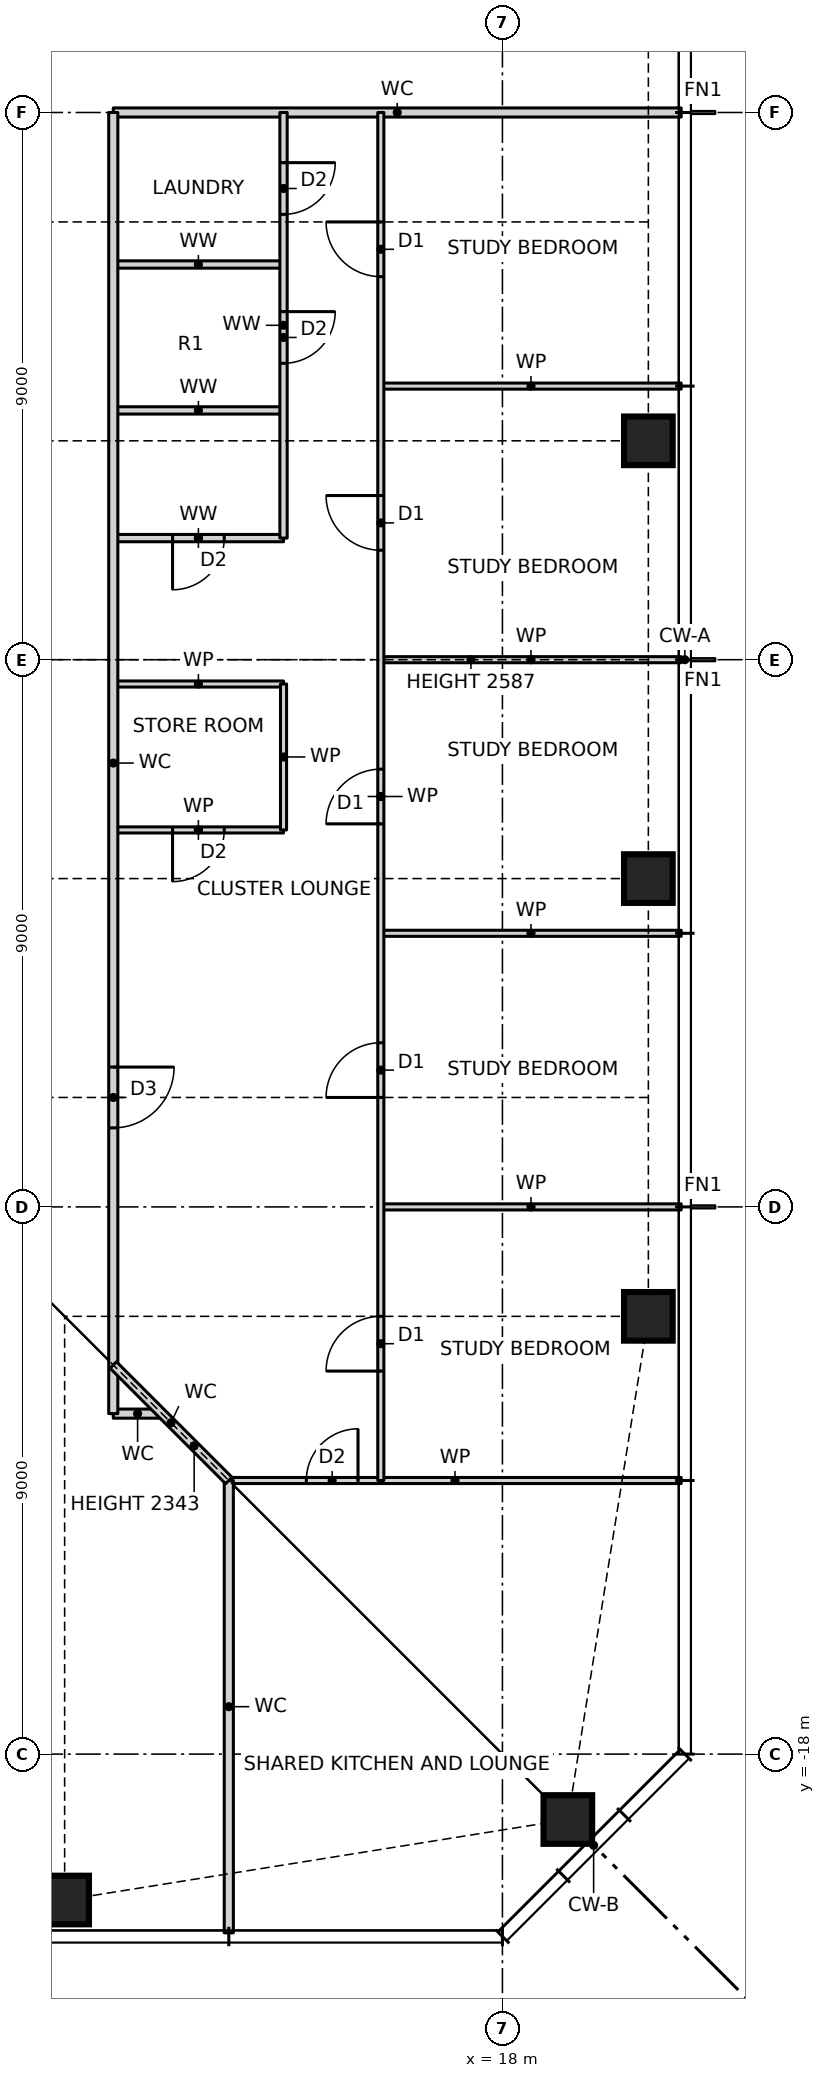
"""IFC4 building model, lengths in metres.
Left out: names, types, materials, properties, quantities, classifications, styles, units other than length and angle.
Written with IfcOpenShell. Run it as: python <this file> out.ifc"""

import sys

from ifc_helpers import new_model, si_unit, direction, frame, frame_2d, origin, origin_2d, place, context, subcontext, project, spatial, rectangle, hollow_rectangle, extrude, element, fill, save


model = new_model("IFC4")
c1 = context("Model", 3, precision=1e-05, world=origin(), true_north=direction((0.0, 1.0)))
c2 = subcontext(c1, "Body", "Model", "MODEL_VIEW")
j1 = project(units=[si_unit("LENGTHUNIT", "METRE"), si_unit("PLANEANGLEUNIT", "RADIAN")], contexts=[c1])
p1 = place(None, origin())
s1 = spatial("IfcSite", under=j1, at=p1, CompositionType="ELEMENT")
p2 = place(p1, origin())
s2 = spatial("IfcBuilding", under=s1, at=p2, CompositionType="ELEMENT")
p3 = place(p2, frame((0.0, 0.0, 84.0)))
s3 = spatial("IfcBuildingStorey", under=s2, at=p3, CompositionType="ELEMENT", Elevation=84.0)
for number, where, z_axis, x_axis in (
    (1, (10.8, -20.4, 0.0), (0.0, 0.0, 1.0), (1.0, 0.0, 0.0)),
    (2, (19.076, -19.076, 0.0), (0.0, 0.0, 1.0), (1.0, 0.0, 0.0)),
    (3, (20.4, -10.8, 0.0), (0.0, 0.0, 1.0), (1.0, 0.0, 0.0)),
    (4, (20.4, -3.6, 0.0), (0.0, 0.0, 1.0), (1.0, 0.0, 0.0)),
    (5, (20.4, 3.6, 0.0), (0.0, 0.0, 1.0), (1.0, 0.0, 0.0)),
):
    element("IfcColumn", number, at=place(p3, frame(where, z_axis=z_axis, x_axis=x_axis)), inside=s3, PredefinedType="COLUMN", context=c2, shape_type="SweptSolid", body=[
        extrude(hollow_rectangle(XDim=0.8, YDim=0.8, WallThickness=0.07, at=origin_2d()), origin(), (0.0, 0.0, 1.0), 3.5),
    ])
p4 = place(p3, frame((13.5, -13.5, 0.0), z_axis=(0.0, 0.0, 1.0), x_axis=(1.0, 0.0, 0.0)))
e6 = element("IfcWall", 6, at=p4, inside=s3, PredefinedType="PARTITIONING", context=c2, shape_type="SweptSolid", body=[
    extrude(rectangle(XDim=7.44, YDim=0.1, at=frame_2d((3.72, 0.0))), origin(), (0.0, 0.0, 1.0), 3.27),
])
p5 = place(p4, frame((1.275, 0.0, 0.0)))
e7 = element("IfcOpeningElement", 7, at=p5, cuts=e6, PredefinedType="OPENING", context=c2, shape_type="SweptSolid", body=[
    extrude(rectangle(XDim=0.85, YDim=2.1, at=frame_2d((0.425, 1.05))), frame((0.0, 0.06, 0.0), z_axis=(0.0, -1.0, 0.0), x_axis=(1.0, 0.0, 0.0)), (0.0, 0.0, 1.0), 0.12),
])
p6 = place(p3, frame((11.6, -12.4, 0.0), z_axis=(0.0, 0.0, 1.0), x_axis=(1.0, 0.0, 0.0)))
e8 = element("IfcWall", 8, at=p6, inside=s3, PredefinedType="PARTITIONING", context=c2, shape_type="SweptSolid", body=[
    extrude(rectangle(XDim=0.8, YDim=0.15, at=frame_2d((0.4, 0.0))), origin(), (0.0, 0.0, 1.0), 3.27),
])
for number, where, z_axis, x_axis in (
    (9, (16.0, -9.0, 0.0), (0.0, 0.0, 1.0), (1.0, 0.0, 0.0)),
    (10, (16.0, -4.5, 0.0), (0.0, 0.0, 1.0), (1.0, 0.0, 0.0)),
):
    element("IfcWall", number, at=place(p3, frame(where, z_axis=z_axis, x_axis=x_axis)), inside=s3, PredefinedType="PARTITIONING", context=c2, shape_type="SweptSolid", body=[
        extrude(rectangle(XDim=4.94, YDim=0.1, at=frame_2d((2.47, 0.0))), origin(), (0.0, 0.0, 1.0), 3.27),
    ])
p7 = place(p3, frame((11.6, -2.8, 0.0), z_axis=(0.0, 0.0, 1.0), x_axis=(1.0, 0.0, 0.0)))
e11 = element("IfcWall", 11, at=p7, inside=s3, PredefinedType="PARTITIONING", context=c2, shape_type="SweptSolid", body=[
    extrude(rectangle(XDim=2.8, YDim=0.1, at=frame_2d((1.4, 0.0))), origin(), (0.0, 0.0, 1.0), 3.27),
])
p8 = place(p7, frame((0.975, 0.0, 0.0)))
e12 = element("IfcOpeningElement", 12, at=p8, cuts=e11, PredefinedType="OPENING", context=c2, shape_type="SweptSolid", body=[
    extrude(rectangle(XDim=0.85, YDim=2.1, at=frame_2d((0.425, 1.05))), frame((0.0, 0.06, 0.0), z_axis=(0.0, -1.0, 0.0), x_axis=(1.0, 0.0, 0.0)), (0.0, 0.0, 1.0), 0.12),
])
p9 = place(p3, frame((11.6, -0.4, 0.0), z_axis=(0.0, 0.0, 1.0), x_axis=(1.0, 0.0, 0.0)))
e13 = element("IfcWall", 13, at=p9, inside=s3, PredefinedType="PARTITIONING", context=c2, shape_type="SweptSolid", body=[
    extrude(rectangle(XDim=2.8, YDim=0.1, at=frame_2d((1.4, 0.0))), origin(), (0.0, 0.0, 1.0), 3.27),
])
p10 = place(p3, frame((16.0, 0.0, 0.0), z_axis=(0.0, 0.0, 1.0), x_axis=(1.0, 0.0, 0.0)))
e14 = element("IfcWall", 14, at=p10, inside=s3, PredefinedType="PARTITIONING", context=c2, shape_type="SweptSolid", body=[
    extrude(rectangle(XDim=4.94, YDim=0.1, at=frame_2d((2.47, 0.0))), origin(), (0.0, 0.0, 1.0), 2.587),
])
p11 = place(p3, frame((11.6, 2.0, 0.0), z_axis=(0.0, 0.0, 1.0), x_axis=(1.0, 0.0, 0.0)))
e15 = element("IfcWall", 15, at=p11, inside=s3, PredefinedType="PARTITIONING", context=c2, shape_type="SweptSolid", body=[
    extrude(rectangle(XDim=2.8, YDim=0.12, at=frame_2d((1.4, 0.0))), origin(), (0.0, 0.0, 1.0), 3.27),
])
p12 = place(p11, frame((0.975, 0.0, 0.0)))
e16 = element("IfcOpeningElement", 16, at=p12, cuts=e15, PredefinedType="OPENING", context=c2, shape_type="SweptSolid", body=[
    extrude(rectangle(XDim=0.85, YDim=2.1, at=frame_2d((0.425, 1.05))), frame((0.0, 0.07, 0.0), z_axis=(0.0, -1.0, 0.0), x_axis=(1.0, 0.0, 0.0)), (0.0, 0.0, 1.0), 0.14),
])
p13 = place(p3, frame((11.6, 4.1, 0.0), z_axis=(0.0, 0.0, 1.0), x_axis=(1.0, 0.0, 0.0)))
e17 = element("IfcWall", 17, at=p13, inside=s3, PredefinedType="PARTITIONING", context=c2, shape_type="SweptSolid", body=[
    extrude(rectangle(XDim=2.8, YDim=0.12, at=frame_2d((1.4, 0.0))), origin(), (0.0, 0.0, 1.0), 3.27),
])
p14 = place(p3, frame((16.0, 4.5, 0.0), z_axis=(0.0, 0.0, 1.0), x_axis=(1.0, 0.0, 0.0)))
e18 = element("IfcWall", 18, at=p14, inside=s3, PredefinedType="PARTITIONING", context=c2, shape_type="SweptSolid", body=[
    extrude(rectangle(XDim=4.94, YDim=0.1, at=frame_2d((2.47, 0.0))), origin(), (0.0, 0.0, 1.0), 3.27),
])
p15 = place(p3, frame((11.6, 6.5, 0.0), z_axis=(0.0, 0.0, 1.0), x_axis=(1.0, 0.0, 0.0)))
e19 = element("IfcWall", 19, at=p15, inside=s3, PredefinedType="PARTITIONING", context=c2, shape_type="SweptSolid", body=[
    extrude(rectangle(XDim=2.8, YDim=0.12, at=frame_2d((1.4, 0.0))), origin(), (0.0, 0.0, 1.0), 3.27),
])
p16 = place(p3, frame((11.6, 9.0, 0.0), z_axis=(0.0, 0.0, 1.0), x_axis=(1.0, 0.0, 0.0)))
e20 = element("IfcWall", 20, at=p16, inside=s3, PredefinedType="PARTITIONING", context=c2, shape_type="SweptSolid", body=[
    extrude(rectangle(XDim=9.34, YDim=0.15, at=frame_2d((4.67, 0.0))), origin(), (0.0, 0.0, 1.0), 3.27),
])
p17 = place(p3, frame((16.0, -13.5, 0.0), z_axis=(0.0, 0.0, 1.0), x_axis=(0.0, 1.0, 0.0)))
e21 = element("IfcWall", 21, at=p17, inside=s3, PredefinedType="PARTITIONING", context=c2, shape_type="SweptSolid", body=[
    extrude(rectangle(XDim=22.5, YDim=0.1, at=frame_2d((11.25, 0.0))), origin(), (0.0, 0.0, 1.0), 3.27),
])
p18 = place(p17, frame((1.8, 0.0, 0.0)))
e22 = element("IfcOpeningElement", 22, at=p18, cuts=e21, PredefinedType="OPENING", context=c2, shape_type="SweptSolid", body=[
    extrude(rectangle(XDim=0.9, YDim=2.1, at=frame_2d((0.45, 1.05))), frame((0.0, 0.06, 0.0), z_axis=(0.0, -1.0, 0.0), x_axis=(1.0, 0.0, 0.0)), (0.0, 0.0, 1.0), 0.12),
])
p19 = place(p17, frame((6.3, 0.0, 0.0)))
e23 = element("IfcOpeningElement", 23, at=p19, cuts=e21, PredefinedType="OPENING", context=c2, shape_type="SweptSolid", body=[
    extrude(rectangle(XDim=0.9, YDim=2.1, at=frame_2d((0.45, 1.05))), frame((0.0, 0.06, 0.0), z_axis=(0.0, -1.0, 0.0), x_axis=(1.0, 0.0, 0.0)), (0.0, 0.0, 1.0), 0.12),
])
p20 = place(p17, frame((10.8, 0.0, 0.0)))
e24 = element("IfcOpeningElement", 24, at=p20, cuts=e21, PredefinedType="OPENING", context=c2, shape_type="SweptSolid", body=[
    extrude(rectangle(XDim=0.9, YDim=2.1, at=frame_2d((0.45, 1.05))), frame((0.0, 0.06, 0.0), z_axis=(0.0, -1.0, 0.0), x_axis=(1.0, 0.0, 0.0)), (0.0, 0.0, 1.0), 0.12),
])
p21 = place(p17, frame((15.3, 0.0, 0.0)))
e25 = element("IfcOpeningElement", 25, at=p21, cuts=e21, PredefinedType="OPENING", context=c2, shape_type="SweptSolid", body=[
    extrude(rectangle(XDim=0.9, YDim=2.1, at=frame_2d((0.45, 1.05))), frame((0.0, 0.06, 0.0), z_axis=(0.0, -1.0, 0.0), x_axis=(1.0, 0.0, 0.0)), (0.0, 0.0, 1.0), 0.12),
])
p22 = place(p17, frame((19.8, 0.0, 0.0)))
e26 = element("IfcOpeningElement", 26, at=p22, cuts=e21, PredefinedType="OPENING", context=c2, shape_type="SweptSolid", body=[
    extrude(rectangle(XDim=0.9, YDim=2.1, at=frame_2d((0.45, 1.05))), frame((0.0, 0.06, 0.0), z_axis=(0.0, -1.0, 0.0), x_axis=(1.0, 0.0, 0.0)), (0.0, 0.0, 1.0), 0.12),
])
p23 = place(p3, frame((14.4, -2.8, 0.0), z_axis=(0.0, 0.0, 1.0), x_axis=(0.0, 1.0, 0.0)))
e27 = element("IfcWall", 27, at=p23, inside=s3, PredefinedType="PARTITIONING", context=c2, shape_type="SweptSolid", body=[
    extrude(rectangle(XDim=2.4, YDim=0.1, at=frame_2d((1.2, 0.0))), origin(), (0.0, 0.0, 1.0), 3.27),
])
p24 = place(p3, frame((14.4, 2.0, 0.0), z_axis=(0.0, 0.0, 1.0), x_axis=(0.0, 1.0, 0.0)))
e28 = element("IfcWall", 28, at=p24, inside=s3, PredefinedType="PARTITIONING", context=c2, shape_type="SweptSolid", body=[
    extrude(rectangle(XDim=7.0, YDim=0.12, at=frame_2d((3.5, 0.0))), origin(), (0.0, 0.0, 1.0), 3.27),
])
p25 = place(p24, frame((2.875, 0.0, 0.0)))
e29 = element("IfcOpeningElement", 29, at=p25, cuts=e28, PredefinedType="OPENING", context=c2, shape_type="SweptSolid", body=[
    extrude(rectangle(XDim=0.85, YDim=2.1, at=frame_2d((0.425, 1.05))), frame((0.0, 0.07, 0.0), z_axis=(0.0, -1.0, 0.0), x_axis=(1.0, 0.0, 0.0)), (0.0, 0.0, 1.0), 0.14),
])
p26 = place(p24, frame((5.325, 0.0, 0.0)))
e30 = element("IfcOpeningElement", 30, at=p26, cuts=e28, PredefinedType="OPENING", context=c2, shape_type="SweptSolid", body=[
    extrude(rectangle(XDim=0.85, YDim=2.1, at=frame_2d((0.425, 1.05))), frame((0.0, 0.07, 0.0), z_axis=(0.0, -1.0, 0.0), x_axis=(1.0, 0.0, 0.0)), (0.0, 0.0, 1.0), 0.14),
])
p27 = place(p3, frame((13.5, -20.94, 0.0), z_axis=(0.0, 0.0, 1.0), x_axis=(0.0, 1.0, 0.0)))
e31 = element("IfcWall", 31, at=p27, inside=s3, PredefinedType="PARTITIONING", context=c2, shape_type="SweptSolid", body=[
    extrude(rectangle(XDim=7.44, YDim=0.15, at=frame_2d((3.72, 0.0))), origin(), (0.0, 0.0, 1.0), 3.27),
])
p28 = place(p3, frame((11.6, -12.4, 0.0), z_axis=(0.0, 0.0, 1.0), x_axis=(0.0, 1.0, 0.0)))
e32 = element("IfcWall", 32, at=p28, inside=s3, PredefinedType="PARTITIONING", context=c2, shape_type="SweptSolid", body=[
    extrude(rectangle(XDim=21.4, YDim=0.15, at=frame_2d((10.7, 0.0))), origin(), (0.0, 0.0, 1.0), 3.27),
])
p29 = place(p28, frame((4.7, 0.0, 0.0)))
e33 = element("IfcOpeningElement", 33, at=p29, cuts=e32, PredefinedType="OPENING", context=c2, shape_type="SweptSolid", body=[
    extrude(rectangle(XDim=1.0, YDim=2.1, at=frame_2d((0.5, 1.05))), frame((0.0, 0.085, 0.0), z_axis=(0.0, -1.0, 0.0), x_axis=(1.0, 0.0, 0.0)), (0.0, 0.0, 1.0), 0.17),
])
p30 = place(p3, frame((13.5, -13.5, 0.0), z_axis=(0.0, 0.0, 1.0), x_axis=(-0.707106781187, 0.707106781187, 0.0)))
e34 = element("IfcWall", 34, at=p30, inside=s3, PredefinedType="PARTITIONING", context=c2, shape_type="SweptSolid", body=[
    extrude(rectangle(XDim=2.687, YDim=0.15, at=frame_2d((1.343, 0.0))), origin(), (0.0, 0.0, 1.0), 2.343),
])
p31 = place(p18, origin())
e35 = element("IfcDoor", 35, at=p31, inside=s3, OperationType="SINGLE_SWING_LEFT", PredefinedType="DOOR", context=c2, shape_type="SweptSolid", body=[
    extrude(rectangle(XDim=0.9, YDim=2.1, at=frame_2d((0.45, 1.05))), frame((0.0, 0.025, 0.0), z_axis=(0.0, -1.0, 0.0), x_axis=(1.0, 0.0, 0.0)), (0.0, 0.0, 1.0), 0.05),
])
fill(e22, e35)
p32 = place(p19, origin())
e36 = element("IfcDoor", 36, at=p32, inside=s3, OperationType="SINGLE_SWING_LEFT", PredefinedType="DOOR", context=c2, shape_type="SweptSolid", body=[
    extrude(rectangle(XDim=0.9, YDim=2.1, at=frame_2d((0.45, 1.05))), frame((0.0, 0.025, 0.0), z_axis=(0.0, -1.0, 0.0), x_axis=(1.0, 0.0, 0.0)), (0.0, 0.0, 1.0), 0.05),
])
fill(e23, e36)
p33 = place(p20, origin())
e37 = element("IfcDoor", 37, at=p33, inside=s3, OperationType="SINGLE_SWING_LEFT", PredefinedType="DOOR", context=c2, shape_type="SweptSolid", body=[
    extrude(rectangle(XDim=0.9, YDim=2.1, at=frame_2d((0.45, 1.05))), frame((0.0, 0.025, 0.0), z_axis=(0.0, -1.0, 0.0), x_axis=(1.0, 0.0, 0.0)), (0.0, 0.0, 1.0), 0.05),
])
fill(e24, e37)
p34 = place(p21, origin())
e38 = element("IfcDoor", 38, at=p34, inside=s3, OperationType="SINGLE_SWING_RIGHT", PredefinedType="DOOR", context=c2, shape_type="SweptSolid", body=[
    extrude(rectangle(XDim=0.9, YDim=2.1, at=frame_2d((0.45, 1.05))), frame((0.0, 0.025, 0.0), z_axis=(0.0, -1.0, 0.0), x_axis=(1.0, 0.0, 0.0)), (0.0, 0.0, 1.0), 0.05),
])
fill(e25, e38)
p35 = place(p22, origin())
e39 = element("IfcDoor", 39, at=p35, inside=s3, OperationType="SINGLE_SWING_RIGHT", PredefinedType="DOOR", context=c2, shape_type="SweptSolid", body=[
    extrude(rectangle(XDim=0.9, YDim=2.1, at=frame_2d((0.45, 1.05))), frame((0.0, 0.025, 0.0), z_axis=(0.0, -1.0, 0.0), x_axis=(1.0, 0.0, 0.0)), (0.0, 0.0, 1.0), 0.05),
])
fill(e26, e39)
p36 = place(p29, frame((1.0, 0.0, 0.0), z_axis=(0.0, 0.0, 1.0), x_axis=(-1.0, 0.0, 0.0)))
e40 = element("IfcDoor", 40, at=p36, inside=s3, OperationType="SINGLE_SWING_LEFT", PredefinedType="DOOR", context=c2, shape_type="SweptSolid", body=[
    extrude(rectangle(XDim=1.0, YDim=2.1, at=frame_2d((0.5, 1.05))), frame((0.0, 0.025, 0.0), z_axis=(0.0, -1.0, 0.0), x_axis=(1.0, 0.0, 0.0)), (0.0, 0.0, 1.0), 0.05),
])
fill(e33, e40)
p37 = place(p8, frame((0.85, 0.0, 0.0), z_axis=(0.0, 0.0, 1.0), x_axis=(-1.0, 0.0, 0.0)))
e41 = element("IfcDoor", 41, at=p37, inside=s3, OperationType="SINGLE_SWING_RIGHT", PredefinedType="DOOR", context=c2, shape_type="SweptSolid", body=[
    extrude(rectangle(XDim=0.85, YDim=2.1, at=frame_2d((0.425, 1.05))), frame((0.0, 0.025, 0.0), z_axis=(0.0, -1.0, 0.0), x_axis=(1.0, 0.0, 0.0)), (0.0, 0.0, 1.0), 0.05),
])
fill(e12, e41)
p38 = place(p12, frame((0.85, 0.0, 0.0), z_axis=(0.0, 0.0, 1.0), x_axis=(-1.0, 0.0, 0.0)))
e42 = element("IfcDoor", 42, at=p38, inside=s3, OperationType="SINGLE_SWING_RIGHT", PredefinedType="DOOR", context=c2, shape_type="SweptSolid", body=[
    extrude(rectangle(XDim=0.85, YDim=2.1, at=frame_2d((0.425, 1.05))), frame((0.0, 0.025, 0.0), z_axis=(0.0, -1.0, 0.0), x_axis=(1.0, 0.0, 0.0)), (0.0, 0.0, 1.0), 0.05),
])
fill(e16, e42)
p39 = place(p25, frame((0.85, 0.0, 0.0), z_axis=(0.0, 0.0, 1.0), x_axis=(-1.0, 0.0, 0.0)))
e43 = element("IfcDoor", 43, at=p39, inside=s3, OperationType="SINGLE_SWING_LEFT", PredefinedType="DOOR", context=c2, shape_type="SweptSolid", body=[
    extrude(rectangle(XDim=0.85, YDim=2.1, at=frame_2d((0.425, 1.05))), frame((0.0, 0.025, 0.0), z_axis=(0.0, -1.0, 0.0), x_axis=(1.0, 0.0, 0.0)), (0.0, 0.0, 1.0), 0.05),
])
fill(e29, e43)
p40 = place(p26, frame((0.85, 0.0, 0.0), z_axis=(0.0, 0.0, 1.0), x_axis=(-1.0, 0.0, 0.0)))
e44 = element("IfcDoor", 44, at=p40, inside=s3, OperationType="SINGLE_SWING_LEFT", PredefinedType="DOOR", context=c2, shape_type="SweptSolid", body=[
    extrude(rectangle(XDim=0.85, YDim=2.1, at=frame_2d((0.425, 1.05))), frame((0.0, 0.025, 0.0), z_axis=(0.0, -1.0, 0.0), x_axis=(1.0, 0.0, 0.0)), (0.0, 0.0, 1.0), 0.05),
])
fill(e30, e44)
p41 = place(p5, origin())
e45 = element("IfcDoor", 45, at=p41, inside=s3, OperationType="SINGLE_SWING_RIGHT", PredefinedType="DOOR", context=c2, shape_type="SweptSolid", body=[
    extrude(rectangle(XDim=0.85, YDim=2.1, at=frame_2d((0.425, 1.05))), frame((0.0, 0.025, 0.0), z_axis=(0.0, -1.0, 0.0), x_axis=(1.0, 0.0, 0.0)), (0.0, 0.0, 1.0), 0.05),
])
fill(e7, e45)
save(model, sys.argv[1])
